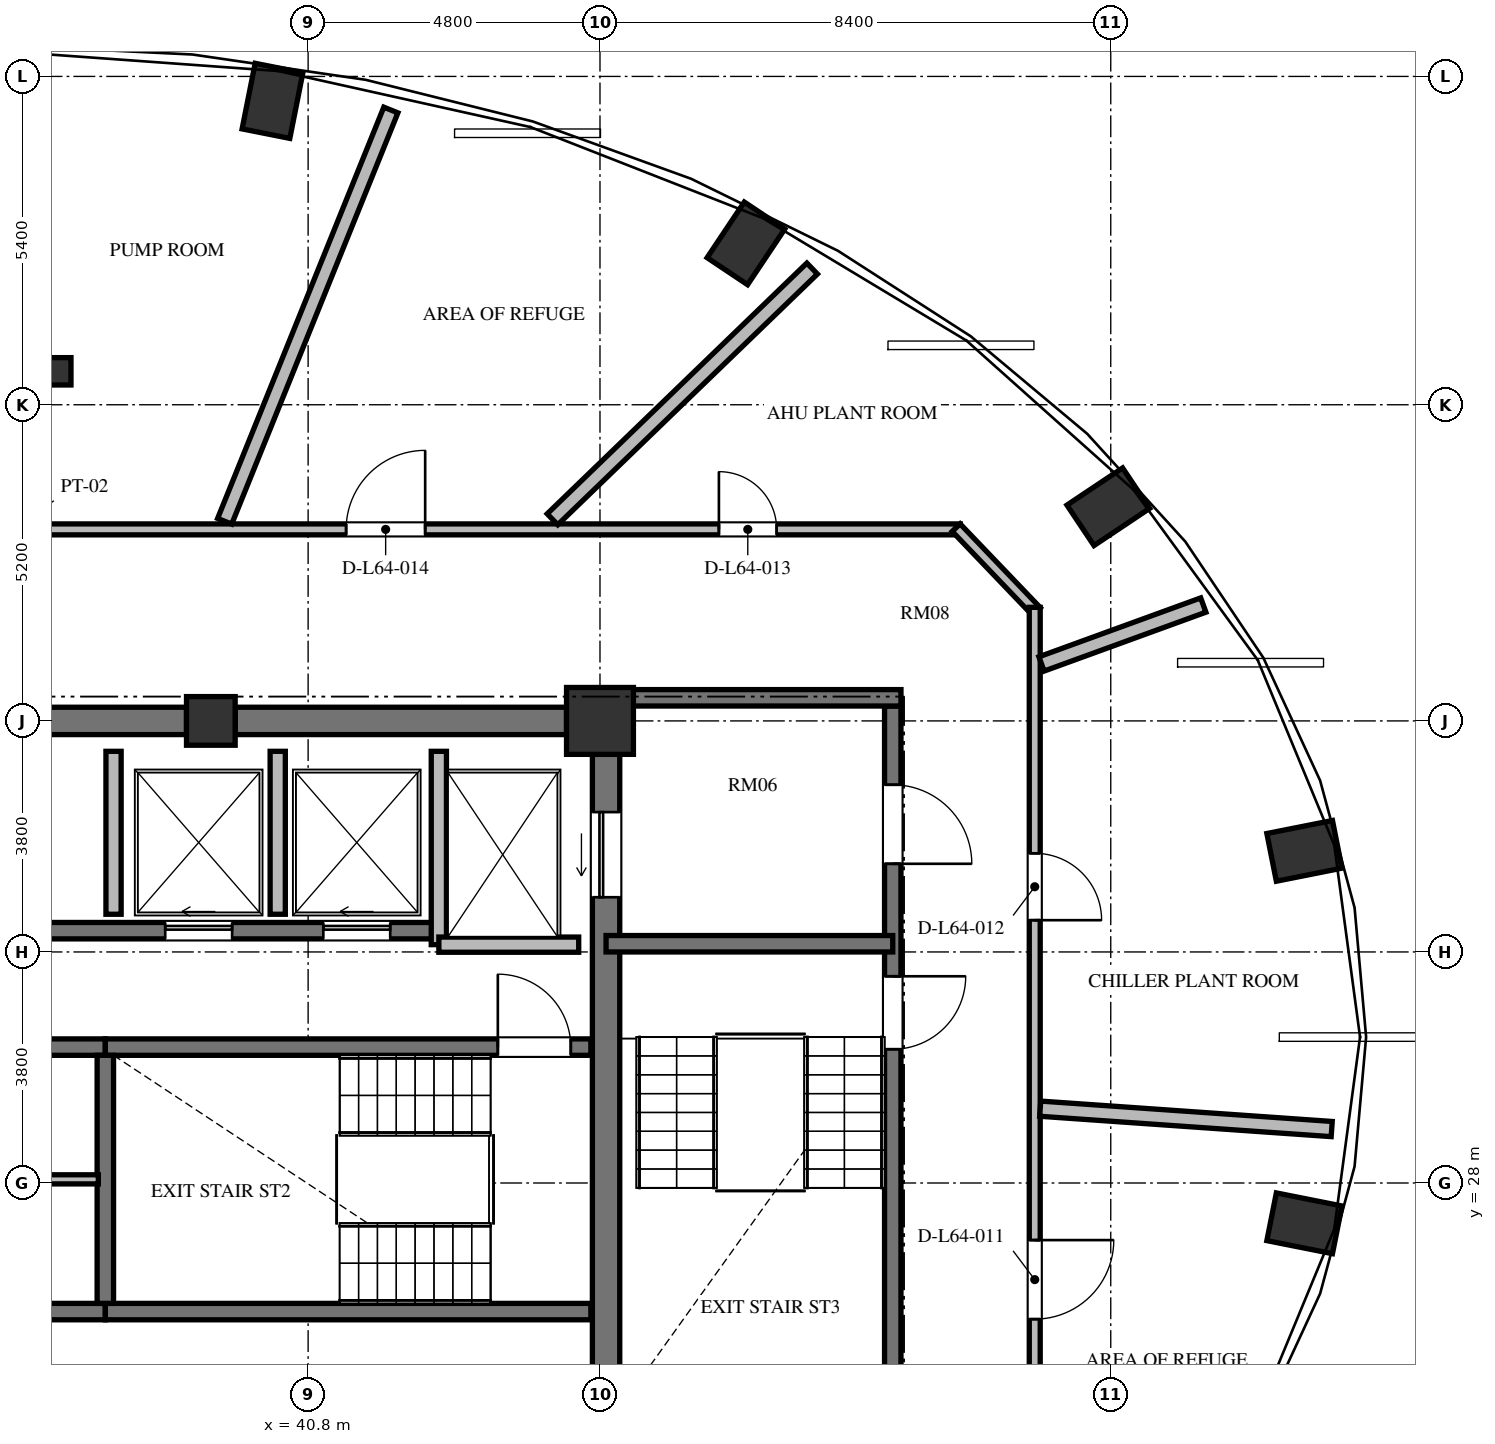
"""IFC4 building model, lengths in metres.
Left out: names, types, materials, properties, quantities, classifications, styles, units other than length and angle.
Written with IfcOpenShell. Run it as: python <this file> out.ifc"""

import sys

from ifc_helpers import new_model, si_unit, direction, frame, frame_2d, origin, origin_2d, place, context, subcontext, project, spatial, rectangle, extrude, element, fill, save


model = new_model("IFC4")
c1 = context("Model", 3, precision=1e-05, world=origin(), true_north=direction((0.0, 1.0)))
c2 = subcontext(c1, "Body", "Model", "MODEL_VIEW")
j1 = project(units=[si_unit("LENGTHUNIT", "METRE"), si_unit("PLANEANGLEUNIT", "RADIAN")], contexts=[c1])
p1 = place(None, origin())
s1 = spatial("IfcSite", under=j1, at=p1, CompositionType="ELEMENT")
p2 = place(p1, origin())
s2 = spatial("IfcBuilding", under=s1, at=p2, CompositionType="ELEMENT")
p3 = place(p2, frame((0.0, 0.0, 245.904)))
s3 = spatial("IfcBuildingStorey", under=s2, at=p3, CompositionType="ELEMENT", Elevation=245.904)
for number, where, z_axis, x_axis in (
    (1, (57.185, 27.337, 0.0), (0.0, 0.0, 1.0), (0.981, -0.195, 0.0)),
    (2, (57.185, 33.463, 0.0), (0.0, 0.0, 1.0), (0.981, 0.195, 0.0)),
    (3, (53.96, 39.123, 0.0), (0.0, 0.0, 1.0), (0.831, 0.556, 0.0)),
    (4, (48.0, 43.454, 0.0), (0.0, 0.0, 1.0), (0.556, 0.831, 0.0)),
    (5, (40.214, 45.798, 0.0), (0.0, 0.0, 1.0), (0.195, 0.981, 0.0)),
):
    element("IfcColumn", number, at=place(p3, frame(where, z_axis=z_axis, x_axis=x_axis)), inside=s3, PredefinedType="COLUMN", context=c2, shape_type="SweptSolid", body=[
        extrude(rectangle(XDim=1.1, YDim=0.8, at=origin_2d()), origin(), (0.0, 0.0, 1.0), 5.472),
    ])
p4 = place(p3, frame((45.6, 35.6, 0.0), z_axis=(0.0, 0.0, 1.0), x_axis=(1.0, 0.0, 0.0)))
e6 = element("IfcColumn", 6, at=p4, inside=s3, PredefinedType="COLUMN", context=c2, shape_type="SweptSolid", body=[
    extrude(rectangle(XDim=1.1, YDim=1.1, at=origin_2d()), origin(), (0.0, 0.0, 1.0), 5.472),
])
p5 = place(p3, frame((39.2, 35.6, 0.0), z_axis=(0.0, 0.0, 1.0), x_axis=(1.0, 0.0, 0.0)))
e7 = element("IfcColumn", 7, at=p5, inside=s3, PredefinedType="COLUMN", context=c2, shape_type="SweptSolid", body=[
    extrude(rectangle(XDim=0.8, YDim=0.8, at=origin_2d()), origin(), (0.0, 0.0, 1.0), 5.472),
])
p6 = place(p3, frame((36.6, 41.35, 0.0), z_axis=(0.0, 0.0, 1.0), x_axis=(1.0, 0.0, 0.0)))
e8 = element("IfcColumn", 8, at=p6, inside=s3, PredefinedType="PILASTER", context=c2, shape_type="SweptSolid", body=[
    extrude(rectangle(XDim=0.6, YDim=0.45, at=origin_2d()), origin(), (0.0, 0.0, 1.0), 5.472),
])
p7 = place(p3, frame((45.7, 20.95, 0.0), z_axis=(0.0, 0.0, 1.0), x_axis=(0.0, 1.0, 0.0)))
e9 = element("IfcWall", 9, at=p7, inside=s3, PredefinedType="SHEAR", context=c2, shape_type="SweptSolid", body=[
    extrude(rectangle(XDim=14.1, YDim=0.45, at=frame_2d((7.05, 0.0))), origin(), (0.0, 0.0, 1.0), 5.472),
])
p8 = place(p7, frame((11.75, 0.0, 0.0)))
e10 = element("IfcOpeningElement", 10, at=p8, cuts=e9, PredefinedType="OPENING", context=c2, shape_type="SweptSolid", body=[
    extrude(rectangle(XDim=1.4, YDim=2.3, at=frame_2d((0.7, 1.15))), frame((0.0, 0.235, 0.0), z_axis=(0.0, -1.0, 0.0), x_axis=(1.0, 0.0, 0.0)), (0.0, 0.0, 1.0), 0.47),
])
p9 = place(p7, frame((0.95, 0.0, 0.0)))
e11 = element("IfcOpeningElement", 11, at=p9, cuts=e9, PredefinedType="OPENING", context=c2, shape_type="SweptSolid", body=[
    extrude(rectangle(XDim=1.4, YDim=2.3, at=frame_2d((0.7, 1.15))), frame((0.0, 0.235, 0.0), z_axis=(0.0, -1.0, 0.0), x_axis=(1.0, 0.0, 0.0)), (0.0, 0.0, 1.0), 0.47),
])
p10 = place(p3, frame((33.2, 35.6, 0.0), z_axis=(0.0, 0.0, 1.0), x_axis=(1.0, 0.0, 0.0)))
e12 = element("IfcWall", 12, at=p10, inside=s3, PredefinedType="SHEAR", context=c2, shape_type="SweptSolid", body=[
    extrude(rectangle(XDim=5.6, YDim=0.45, at=frame_2d((2.8, 0.0))), origin(), (0.0, 0.0, 1.0), 5.472),
])
p11 = place(p3, frame((39.6, 35.6, 0.0), z_axis=(0.0, 0.0, 1.0), x_axis=(1.0, 0.0, 0.0)))
e13 = element("IfcWall", 13, at=p11, inside=s3, PredefinedType="SHEAR", context=c2, shape_type="SweptSolid", body=[
    extrude(rectangle(XDim=5.45, YDim=0.45, at=frame_2d((2.725, 0.0))), origin(), (0.0, 0.0, 1.0), 5.472),
])
p12 = place(p3, frame((34.535, 30.235, 0.0), z_axis=(0.0, 0.0, 1.0), x_axis=(1.0, 0.0, 0.0)))
e14 = element("IfcWall", 14, at=p12, inside=s3, PredefinedType="SHEAR", context=c2, shape_type="SweptSolid", body=[
    extrude(rectangle(XDim=2.93, YDim=0.27, at=frame_2d((1.465, 0.0))), origin(), (0.0, 0.0, 1.0), 5.472),
])
p13 = place(p12, frame((0.915, 0.0, 0.0)))
e15 = element("IfcOpeningElement", 15, at=p13, cuts=e14, PredefinedType="OPENING", context=c2, shape_type="SweptSolid", body=[
    extrude(rectangle(XDim=1.1, YDim=2.15, at=frame_2d((0.55, 1.075))), frame((0.0, 0.145, 0.0), z_axis=(0.0, -1.0, 0.0), x_axis=(1.0, 0.0, 0.0)), (0.0, 0.0, 1.0), 0.29),
])
p14 = place(p3, frame((37.465, 30.235, 0.0), z_axis=(0.0, 0.0, 1.0), x_axis=(1.0, 0.0, 0.0)))
e16 = element("IfcWall", 16, at=p14, inside=s3, PredefinedType="SHEAR", context=c2, shape_type="SweptSolid", body=[
    extrude(rectangle(XDim=7.985, YDim=0.27, at=frame_2d((3.992, 0.0))), origin(), (0.0, 0.0, 1.0), 5.472),
])
p15 = place(p14, frame((6.455, 0.0, 0.0)))
e17 = element("IfcOpeningElement", 17, at=p15, cuts=e16, PredefinedType="OPENING", context=c2, shape_type="SweptSolid", body=[
    extrude(rectangle(XDim=1.2, YDim=2.15, at=frame_2d((0.6, 1.075))), frame((0.0, 0.145, 0.0), z_axis=(0.0, -1.0, 0.0), x_axis=(1.0, 0.0, 0.0)), (0.0, 0.0, 1.0), 0.29),
])
p16 = place(p3, frame((34.535, 25.885, 0.0), z_axis=(0.0, 0.0, 1.0), x_axis=(1.0, 0.0, 0.0)))
e18 = element("IfcWall", 18, at=p16, inside=s3, PredefinedType="SHEAR", context=c2, shape_type="SweptSolid", body=[
    extrude(rectangle(XDim=2.93, YDim=0.27, at=frame_2d((1.465, 0.0))), origin(), (0.0, 0.0, 1.0), 5.472),
])
p17 = place(p16, frame((0.94, 0.0, 0.0)))
e19 = element("IfcOpeningElement", 19, at=p17, cuts=e18, PredefinedType="OPENING", context=c2, shape_type="SweptSolid", body=[
    extrude(rectangle(XDim=1.05, YDim=2.15, at=frame_2d((0.525, 1.075))), frame((0.0, 0.145, 0.0), z_axis=(0.0, -1.0, 0.0), x_axis=(1.0, 0.0, 0.0)), (0.0, 0.0, 1.0), 0.29),
])
p18 = place(p3, frame((37.465, 25.885, 0.0), z_axis=(0.0, 0.0, 1.0), x_axis=(1.0, 0.0, 0.0)))
e20 = element("IfcWall", 20, at=p18, inside=s3, PredefinedType="SHEAR", context=c2, shape_type="SweptSolid", body=[
    extrude(rectangle(XDim=7.985, YDim=0.27, at=frame_2d((3.992, 0.0))), origin(), (0.0, 0.0, 1.0), 5.472),
])
p19 = place(p3, frame((37.465, 26.02, 0.0), z_axis=(0.0, 0.0, 1.0), x_axis=(0.0, 1.0, 0.0)))
e21 = element("IfcWall", 21, at=p19, inside=s3, PredefinedType="SHEAR", context=c2, shape_type="SweptSolid", body=[
    extrude(rectangle(XDim=4.08, YDim=0.27, at=frame_2d((2.04, 0.0))), origin(), (0.0, 0.0, 1.0), 5.472),
])
p20 = place(p3, frame((34.65, 28.06, 0.0), z_axis=(0.0, 0.0, 1.0), x_axis=(1.0, 0.0, 0.0)))
e22 = element("IfcWall", 22, at=p20, inside=s3, PredefinedType="PARTITIONING", context=c2, shape_type="SweptSolid", body=[
    extrude(rectangle(XDim=2.7, YDim=0.15, at=frame_2d((1.35, 0.0))), origin(), (0.0, 0.0, 1.0), 5.272),
])
p21 = place(p3, frame((26.55, 32.15, 0.0), z_axis=(0.0, 0.0, 1.0), x_axis=(1.0, 0.0, 0.0)))
e23 = element("IfcWall", 23, at=p21, inside=s3, PredefinedType="SHEAR", context=c2, shape_type="SweptSolid", body=[
    extrude(rectangle(XDim=16.4, YDim=0.27, at=frame_2d((8.2, 0.0))), origin(), (0.0, 0.0, 1.0), 5.472),
])
p22 = place(p21, frame((2.175, 0.0, 0.0)))
e24 = element("IfcOpeningElement", 24, at=p22, cuts=e23, PredefinedType="OPENING", context=c2, shape_type="SweptSolid", body=[
    extrude(rectangle(XDim=1.05, YDim=2.15, at=frame_2d((0.525, 1.075))), frame((0.0, 0.145, 0.0), z_axis=(0.0, -1.0, 0.0), x_axis=(1.0, 0.0, 0.0)), (0.0, 0.0, 1.0), 0.29),
])
p23 = place(p21, frame((7.575, 0.0, 0.0)))
e25 = element("IfcOpeningElement", 25, at=p23, cuts=e23, PredefinedType="OPENING", context=c2, shape_type="SweptSolid", body=[
    extrude(rectangle(XDim=1.05, YDim=2.15, at=frame_2d((0.525, 1.075))), frame((0.0, 0.145, 0.0), z_axis=(0.0, -1.0, 0.0), x_axis=(1.0, 0.0, 0.0)), (0.0, 0.0, 1.0), 0.29),
])
p24 = place(p21, frame((11.9, 0.0, 0.0)))
e26 = element("IfcOpeningElement", 26, at=p24, cuts=e23, PredefinedType="OPENING", context=c2, shape_type="SweptSolid", body=[
    extrude(rectangle(XDim=1.1, YDim=2.2, at=frame_2d((0.55, 1.1))), frame((0.0, 0.145, 0.0), z_axis=(0.0, -1.0, 0.0), x_axis=(1.0, 0.0, 0.0)), (0.0, 0.0, 1.0), 0.29),
])
p25 = place(p21, frame((14.5, 0.0, 0.0)))
e27 = element("IfcOpeningElement", 27, at=p25, cuts=e23, PredefinedType="OPENING", context=c2, shape_type="SweptSolid", body=[
    extrude(rectangle(XDim=1.1, YDim=2.2, at=frame_2d((0.55, 1.1))), frame((0.0, 0.145, 0.0), z_axis=(0.0, -1.0, 0.0), x_axis=(1.0, 0.0, 0.0)), (0.0, 0.0, 1.0), 0.29),
])
p26 = place(p3, frame((42.95, 31.92, 0.0), z_axis=(0.0, 0.0, 1.0), x_axis=(0.0, 1.0, 0.0)))
e28 = element("IfcWall", 28, at=p26, inside=s3, PredefinedType="SOLIDWALL", context=c2, shape_type="SweptSolid", body=[
    extrude(rectangle(XDim=3.18, YDim=0.25, at=frame_2d((1.59, 0.0))), origin(), (0.0, 0.0, 1.0), 5.272),
])
p27 = place(p3, frame((42.95, 31.92, 0.0), z_axis=(0.0, 0.0, 1.0), x_axis=(1.0, 0.0, 0.0)))
e29 = element("IfcWall", 29, at=p27, inside=s3, PredefinedType="SOLIDWALL", context=c2, shape_type="SweptSolid", body=[
    extrude(rectangle(XDim=2.3, YDim=0.25, at=frame_2d((1.15, 0.0))), origin(), (0.0, 0.0, 1.0), 5.272),
])
for number, where, z_axis, x_axis in (
    (30, (37.6, 32.42, 0.0), (0.0, 0.0, 1.0), (0.0, 1.0, 0.0)),
    (31, (40.3, 32.42, 0.0), (0.0, 0.0, 1.0), (0.0, 1.0, 0.0)),
):
    element("IfcWall", number, at=place(p3, frame(where, z_axis=z_axis, x_axis=x_axis)), inside=s3, PredefinedType="SOLIDWALL", context=c2, shape_type="SweptSolid", body=[
        extrude(rectangle(XDim=2.68, YDim=0.25, at=frame_2d((1.34, 0.0))), origin(), (0.0, 0.0, 1.0), 5.272),
    ])
p28 = place(p3, frame((50.415, 35.845, 0.0), z_axis=(0.0, 0.0, 1.0), x_axis=(0.0, -1.0, 0.0)))
e32 = element("IfcWall", 32, at=p28, inside=s3, PredefinedType="SHEAR", context=c2, shape_type="SweptSolid", body=[
    extrude(rectangle(XDim=15.825, YDim=0.27, at=frame_2d((7.913, 0.0))), origin(), (0.0, 0.0, 1.0), 5.472),
])
p29 = place(p28, frame((4.445, 0.0, 0.0)))
e33 = element("IfcOpeningElement", 33, at=p29, cuts=e32, PredefinedType="OPENING", context=c2, shape_type="SweptSolid", body=[
    extrude(rectangle(XDim=1.2, YDim=2.15, at=frame_2d((0.6, 1.075))), frame((0.0, 0.145, 0.0), z_axis=(0.0, -1.0, 0.0), x_axis=(1.0, 0.0, 0.0)), (0.0, 0.0, 1.0), 0.29),
])
p30 = place(p28, frame((1.295, 0.0, 0.0)))
e34 = element("IfcOpeningElement", 34, at=p30, cuts=e32, PredefinedType="OPENING", context=c2, shape_type="SweptSolid", body=[
    extrude(rectangle(XDim=1.3, YDim=2.2, at=frame_2d((0.65, 1.1))), frame((0.0, 0.145, 0.0), z_axis=(0.0, -1.0, 0.0), x_axis=(1.0, 0.0, 0.0)), (0.0, 0.0, 1.0), 0.29),
])
p31 = place(p28, frame((13.095, 0.0, 0.0)))
e35 = element("IfcOpeningElement", 35, at=p31, cuts=e32, PredefinedType="OPENING", context=c2, shape_type="SweptSolid", body=[
    extrude(rectangle(XDim=1.3, YDim=2.2, at=frame_2d((0.65, 1.1))), frame((0.0, 0.145, 0.0), z_axis=(0.0, -1.0, 0.0), x_axis=(1.0, 0.0, 0.0)), (0.0, 0.0, 1.0), 0.29),
])
p32 = place(p3, frame((45.925, 35.98, 0.0), z_axis=(0.0, 0.0, 1.0), x_axis=(1.0, 0.0, 0.0)))
e36 = element("IfcWall", 36, at=p32, inside=s3, PredefinedType="SHEAR", context=c2, shape_type="SweptSolid", body=[
    extrude(rectangle(XDim=4.625, YDim=0.27, at=frame_2d((2.312, 0.0))), origin(), (0.0, 0.0, 1.0), 5.472),
])
p33 = place(p3, frame((45.7, 31.935, 0.0), z_axis=(0.0, 0.0, 1.0), x_axis=(1.0, 0.0, 0.0)))
e37 = element("IfcWall", 37, at=p33, inside=s3, PredefinedType="SHEAR", context=c2, shape_type="SweptSolid", body=[
    extrude(rectangle(XDim=4.715, YDim=0.27, at=frame_2d((2.357, 0.0))), origin(), (0.0, 0.0, 1.0), 5.472),
])
p34 = place(p3, frame((30.71, 38.75, 0.0), z_axis=(0.0, 0.0, 1.0), x_axis=(1.0, 0.0, 0.0)))
e38 = element("IfcWall", 38, at=p34, inside=s3, PredefinedType="PARTITIONING", context=c2, shape_type="SweptSolid", body=[
    extrude(rectangle(XDim=20.815, YDim=0.18, at=frame_2d((10.408, 0.0))), origin(), (0.0, 0.0, 1.0), 4.897),
])
p35 = place(p34, frame((16.846, 0.0, 0.0)))
e39 = element("IfcOpeningElement", 39, at=p35, cuts=e38, PredefinedType="OPENING", context=c2, shape_type="SweptSolid", body=[
    extrude(rectangle(XDim=0.95, YDim=2.1, at=frame_2d((0.475, 1.05))), frame((0.0, 0.1, 0.0), z_axis=(0.0, -1.0, 0.0), x_axis=(1.0, 0.0, 0.0)), (0.0, 0.0, 1.0), 0.2),
])
p36 = place(p34, frame((10.715, 0.0, 0.0)))
e40 = element("IfcOpeningElement", 40, at=p36, cuts=e38, PredefinedType="OPENING", context=c2, shape_type="SweptSolid", body=[
    extrude(rectangle(XDim=1.3, YDim=2.2, at=frame_2d((0.65, 1.1))), frame((0.0, 0.1, 0.0), z_axis=(0.0, -1.0, 0.0), x_axis=(1.0, 0.0, 0.0)), (0.0, 0.0, 1.0), 0.2),
])
p37 = place(p34, frame((4.545, 0.0, 0.0)))
e41 = element("IfcOpeningElement", 41, at=p37, cuts=e38, PredefinedType="OPENING", context=c2, shape_type="SweptSolid", body=[
    extrude(rectangle(XDim=1.1, YDim=2.15, at=frame_2d((0.55, 1.075))), frame((0.0, 0.1, 0.0), z_axis=(0.0, -1.0, 0.0), x_axis=(1.0, 0.0, 0.0)), (0.0, 0.0, 1.0), 0.2),
])
p38 = place(p3, frame((51.458, 38.779, 0.0), z_axis=(0.0, 0.0, 1.0), x_axis=(0.691335855544, -0.722533552743, 0.0)))
e42 = element("IfcWall", 42, at=p38, inside=s3, PredefinedType="PARTITIONING", context=c2, shape_type="SweptSolid", body=[
    extrude(rectangle(XDim=1.909, YDim=0.18, at=frame_2d((0.955, 0.0))), origin(), (0.0, 0.0, 1.0), 4.857),
])
p39 = place(p3, frame((52.75, 37.468, 0.0), z_axis=(0.0, 0.0, 1.0), x_axis=(0.0, -1.0, 0.0)))
e43 = element("IfcWall", 43, at=p39, inside=s3, PredefinedType="PARTITIONING", context=c2, shape_type="SweptSolid", body=[
    extrude(rectangle(XDim=14.136, YDim=0.18, at=frame_2d((7.068, 0.0))), origin(), (0.0, 0.0, 1.0), 5.272),
])
p40 = place(p39, frame((10.407, 0.0, 0.0)))
e44 = element("IfcOpeningElement", 44, at=p40, cuts=e43, PredefinedType="OPENING", context=c2, shape_type="SweptSolid", body=[
    extrude(rectangle(XDim=1.3, YDim=2.2, at=frame_2d((0.65, 1.1))), frame((0.0, 0.1, 0.0), z_axis=(0.0, -1.0, 0.0), x_axis=(1.0, 0.0, 0.0)), (0.0, 0.0, 1.0), 0.2),
])
p41 = place(p39, frame((4.046, 0.0, 0.0)))
e45 = element("IfcOpeningElement", 45, at=p41, cuts=e43, PredefinedType="OPENING", context=c2, shape_type="SweptSolid", body=[
    extrude(rectangle(XDim=1.1, YDim=2.15, at=frame_2d((0.55, 1.075))), frame((0.0, 0.1, 0.0), z_axis=(0.0, -1.0, 0.0), x_axis=(1.0, 0.0, 0.0)), (0.0, 0.0, 1.0), 0.2),
])
p42 = place(p3, frame((52.84, 29.222, 0.0), z_axis=(0.0, 0.0, 1.0), x_axis=(0.997564343245, -0.069752283728, 0.0)))
e46 = element("IfcWall", 46, at=p42, inside=s3, PredefinedType="SOLIDWALL", context=c2, shape_type="SweptSolid", body=[
    extrude(rectangle(XDim=4.806, YDim=0.25, at=frame_2d((2.403, 0.0))), origin(), (0.0, 0.0, 1.0), 5.272),
])
p43 = place(p3, frame((52.861, 36.537, 0.0), z_axis=(0.0, 0.0, 1.0), x_axis=(0.93969017074, 0.342026874697, 0.0)))
e47 = element("IfcWall", 47, at=p43, inside=s3, PredefinedType="SOLIDWALL", context=c2, shape_type="SweptSolid", body=[
    extrude(rectangle(XDim=2.832, YDim=0.25, at=frame_2d((1.416, 0.0))), origin(), (0.0, 0.0, 1.0), 5.272),
])
p44 = place(p3, frame((44.819, 38.916, 0.0), z_axis=(0.0, 0.0, 1.0), x_axis=(0.719336266848, 0.694662029477, 0.0)))
e48 = element("IfcWall", 48, at=p44, inside=s3, PredefinedType="SOLIDWALL", context=c2, shape_type="SweptSolid", body=[
    extrude(rectangle(XDim=5.937, YDim=0.25, at=frame_2d((2.968, 0.0))), origin(), (0.0, 0.0, 1.0), 5.272),
])
p45 = place(p3, frame((39.428, 38.884, 0.0), z_axis=(0.0, 0.0, 1.0), x_axis=(0.374590867969, 0.927190207905, 0.0)))
e49 = element("IfcWall", 49, at=p45, inside=s3, PredefinedType="SOLIDWALL", context=c2, shape_type="SweptSolid", body=[
    extrude(rectangle(XDim=7.295, YDim=0.25, at=frame_2d((3.647, 0.0))), origin(), (0.0, 0.0, 1.0), 5.272),
])
p46 = place(p15, origin())
e50 = element("IfcDoor", 50, at=p46, inside=s3, OperationType="SINGLE_SWING_LEFT", PredefinedType="DOOR", context=c2, shape_type="SweptSolid", body=[
    extrude(rectangle(XDim=1.2, YDim=2.15, at=frame_2d((0.6, 1.075))), frame((0.0, 0.025, 0.0), z_axis=(0.0, -1.0, 0.0), x_axis=(1.0, 0.0, 0.0)), (0.0, 0.0, 1.0), 0.05),
])
fill(e17, e50)
p47 = place(p24, origin())
e51 = element("IfcDoor", 51, at=p47, inside=s3, OperationType="SLIDING_TO_LEFT", PredefinedType="DOOR", context=c2, shape_type="SweptSolid", body=[
    extrude(rectangle(XDim=1.1, YDim=2.2, at=frame_2d((0.55, 1.1))), frame((0.0, 0.025, 0.0), z_axis=(0.0, -1.0, 0.0), x_axis=(1.0, 0.0, 0.0)), (0.0, 0.0, 1.0), 0.05),
])
fill(e26, e51)
p48 = place(p25, origin())
e52 = element("IfcDoor", 52, at=p48, inside=s3, OperationType="SLIDING_TO_LEFT", PredefinedType="DOOR", context=c2, shape_type="SweptSolid", body=[
    extrude(rectangle(XDim=1.1, YDim=2.2, at=frame_2d((0.55, 1.1))), frame((0.0, 0.025, 0.0), z_axis=(0.0, -1.0, 0.0), x_axis=(1.0, 0.0, 0.0)), (0.0, 0.0, 1.0), 0.05),
])
fill(e27, e52)
p49 = place(p8, origin())
e53 = element("IfcDoor", 53, at=p49, inside=s3, OperationType="SLIDING_TO_LEFT", PredefinedType="DOOR", context=c2, shape_type="SweptSolid", body=[
    extrude(rectangle(XDim=1.4, YDim=2.3, at=frame_2d((0.7, 1.15))), frame((0.0, 0.025, 0.0), z_axis=(0.0, -1.0, 0.0), x_axis=(1.0, 0.0, 0.0)), (0.0, 0.0, 1.0), 0.05),
])
fill(e10, e53)
p50 = place(p29, origin())
e54 = element("IfcDoor", 54, at=p50, inside=s3, OperationType="SINGLE_SWING_LEFT", PredefinedType="DOOR", context=c2, shape_type="SweptSolid", body=[
    extrude(rectangle(XDim=1.2, YDim=2.15, at=frame_2d((0.6, 1.075))), frame((0.0, 0.025, 0.0), z_axis=(0.0, -1.0, 0.0), x_axis=(1.0, 0.0, 0.0)), (0.0, 0.0, 1.0), 0.05),
])
fill(e33, e54)
p51 = place(p30, origin())
e55 = element("IfcDoor", 55, at=p51, inside=s3, OperationType="SINGLE_SWING_RIGHT", PredefinedType="DOOR", context=c2, shape_type="SweptSolid", body=[
    extrude(rectangle(XDim=1.3, YDim=2.2, at=frame_2d((0.65, 1.1))), frame((0.0, 0.025, 0.0), z_axis=(0.0, -1.0, 0.0), x_axis=(1.0, 0.0, 0.0)), (0.0, 0.0, 1.0), 0.05),
])
fill(e34, e55)
p52 = place(p40, origin())
e56 = element("IfcDoor", 56, at=p52, inside=s3, OperationType="SINGLE_SWING_LEFT", PredefinedType="DOOR", context=c2, shape_type="SweptSolid", body=[
    extrude(rectangle(XDim=1.3, YDim=2.2, at=frame_2d((0.65, 1.1))), frame((0.0, 0.025, 0.0), z_axis=(0.0, -1.0, 0.0), x_axis=(1.0, 0.0, 0.0)), (0.0, 0.0, 1.0), 0.05),
])
fill(e44, e56)
p53 = place(p41, origin())
e57 = element("IfcDoor", 57, at=p53, inside=s3, OperationType="SINGLE_SWING_RIGHT", PredefinedType="DOOR", context=c2, shape_type="SweptSolid", body=[
    extrude(rectangle(XDim=1.1, YDim=2.15, at=frame_2d((0.55, 1.075))), frame((0.0, 0.025, 0.0), z_axis=(0.0, -1.0, 0.0), x_axis=(1.0, 0.0, 0.0)), (0.0, 0.0, 1.0), 0.05),
])
fill(e45, e57)
p54 = place(p35, origin())
e58 = element("IfcDoor", 58, at=p54, inside=s3, OperationType="SINGLE_SWING_LEFT", PredefinedType="DOOR", context=c2, shape_type="SweptSolid", body=[
    extrude(rectangle(XDim=0.95, YDim=2.1, at=frame_2d((0.475, 1.05))), frame((0.0, 0.025, 0.0), z_axis=(0.0, -1.0, 0.0), x_axis=(1.0, 0.0, 0.0)), (0.0, 0.0, 1.0), 0.05),
])
fill(e39, e58)
p55 = place(p36, origin())
e59 = element("IfcDoor", 59, at=p55, inside=s3, OperationType="SINGLE_SWING_RIGHT", PredefinedType="DOOR", context=c2, shape_type="SweptSolid", body=[
    extrude(rectangle(XDim=1.3, YDim=2.2, at=frame_2d((0.65, 1.1))), frame((0.0, 0.025, 0.0), z_axis=(0.0, -1.0, 0.0), x_axis=(1.0, 0.0, 0.0)), (0.0, 0.0, 1.0), 0.05),
])
fill(e40, e59)
save(model, sys.argv[1])
